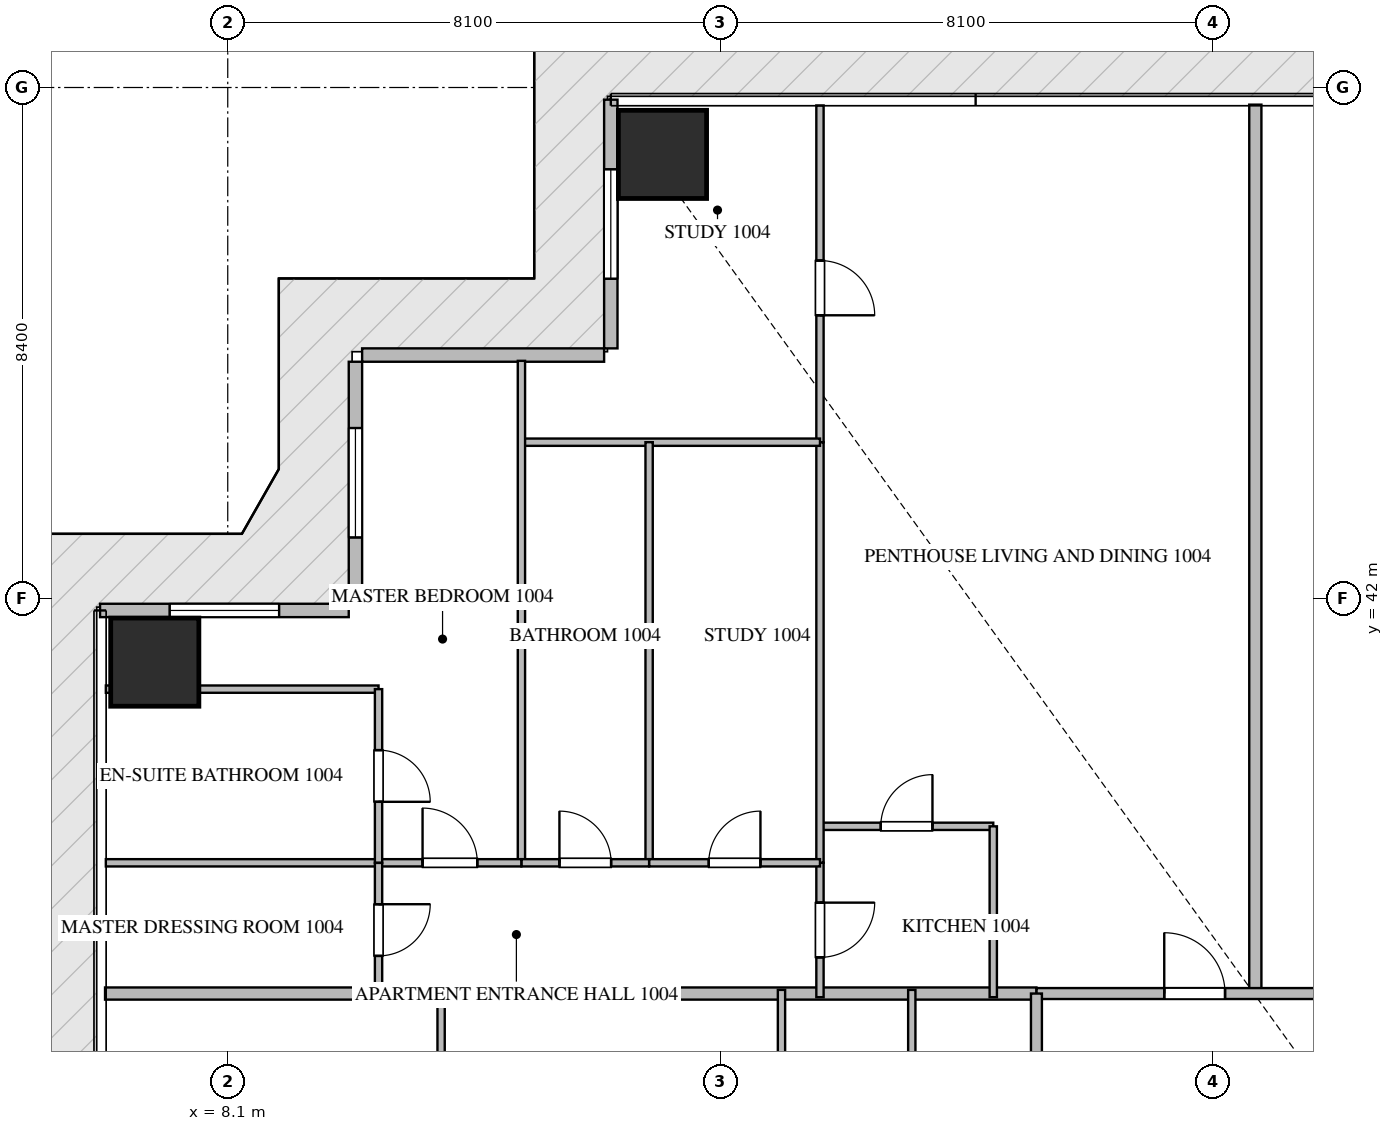
"""IFC4 building model, lengths in metres.
Left out: names, types, materials, properties, quantities, classifications, styles, units other than length and angle.
Written with IfcOpenShell. Run it as: python <this file> out.ifc"""

import sys

from ifc_helpers import new_model, si_unit, direction, frame, frame_2d, origin, origin_2d, place, context, subcontext, project, spatial, rectangle, extrude, source, transform, mapped, element, fill, save


model = new_model("IFC4")
c1 = context("Model", 3, precision=1e-05, world=origin(), true_north=direction((0.0, 1.0)))
c2 = subcontext(c1, "Body", "Model", "MODEL_VIEW")
j1 = project(units=[si_unit("LENGTHUNIT", "METRE"), si_unit("PLANEANGLEUNIT", "RADIAN")], contexts=[c1])
p1 = place(None, origin())
s1 = spatial("IfcSite", under=j1, at=p1, CompositionType="ELEMENT")
p2 = place(p1, origin())
s2 = spatial("IfcBuilding", under=s1, at=p2, CompositionType="ELEMENT")
p3 = place(p2, frame((0.0, 0.0, 45.45)))
s3 = spatial("IfcBuildingStorey", under=s2, at=p3, CompositionType="ELEMENT", Elevation=45.45)
m1 = source(origin(), c2, "Body", "SweptSolid", [
    extrude(rectangle(XDim=1.45, YDim=1.45, at=origin_2d()), origin(), (0.0, 0.0, 1.0), 3.75),
])
for number, where, z_axis, x_axis in (
    (1, (15.25, 49.3, -0.26), (0.0, 0.0, 1.0), (1.0, 0.0, 0.0)),
    (2, (6.9, 40.95, -0.26), (0.0, 0.0, 1.0), (1.0, 0.0, 0.0)),
):
    element("IfcColumn", number, at=place(p3, frame(where, z_axis=z_axis, x_axis=x_axis)), inside=s3, PredefinedType="COLUMN", context=c2, shape_type="MappedRepresentation", body=[
        mapped(m1, transform((0.0, 0.0, 0.0), scale=1.0)),
    ])
p4 = place(p3, frame((14.4, 50.2, 0.0), z_axis=(0.0, 0.0, 1.0), x_axis=(0.0, -1.0, 0.0)))
e3 = element("IfcWall", 3, at=p4, inside=s3, PredefinedType="ELEMENTEDWALL", context=c2, shape_type="SweptSolid", body=[
    extrude(rectangle(XDim=4.09, YDim=0.22, at=frame_2d((2.045, 0.0))), origin(), (0.0, 0.0, 1.0), 3.475),
])
p5 = place(p4, frame((1.145, 0.0, 0.65)))
e4 = element("IfcOpeningElement", 4, at=p5, cuts=e3, PredefinedType="OPENING", context=c2, shape_type="SweptSolid", body=[
    extrude(rectangle(XDim=1.8, YDim=2.1, at=frame_2d((0.9, 1.05))), frame((0.0, 0.12, 0.0), z_axis=(0.0, -1.0, 0.0), x_axis=(1.0, 0.0, 0.0)), (0.0, 0.0, 1.0), 0.24),
])
p6 = place(p3, frame((14.29, 46.0, 0.0), z_axis=(0.0, 0.0, 1.0), x_axis=(-1.0, 0.0, 0.0)))
e5 = element("IfcWall", 5, at=p6, inside=s3, PredefinedType="ELEMENTEDWALL", context=c2, shape_type="SweptSolid", body=[
    extrude(rectangle(XDim=3.98, YDim=0.22, at=frame_2d((1.99, 0.0))), origin(), (0.0, 0.0, 1.0), 3.475),
])
p7 = place(p3, frame((10.2, 45.89, 0.0), z_axis=(0.0, 0.0, 1.0), x_axis=(0.0, -1.0, 0.0)))
e6 = element("IfcWall", 6, at=p7, inside=s3, PredefinedType="ELEMENTEDWALL", context=c2, shape_type="SweptSolid", body=[
    extrude(rectangle(XDim=3.98, YDim=0.22, at=frame_2d((1.99, 0.0))), origin(), (0.0, 0.0, 1.0), 3.475),
])
p8 = place(p7, frame((1.09, 0.0, 0.65)))
e7 = element("IfcOpeningElement", 7, at=p8, cuts=e6, PredefinedType="OPENING", context=c2, shape_type="SweptSolid", body=[
    extrude(rectangle(XDim=1.8, YDim=2.1, at=frame_2d((0.9, 1.05))), frame((0.0, 0.12, 0.0), z_axis=(0.0, -1.0, 0.0), x_axis=(1.0, 0.0, 0.0)), (0.0, 0.0, 1.0), 0.24),
])
p9 = place(p3, frame((10.09, 41.8, 0.0), z_axis=(0.0, 0.0, 1.0), x_axis=(-1.0, 0.0, 0.0)))
e8 = element("IfcWall", 8, at=p9, inside=s3, PredefinedType="ELEMENTEDWALL", context=c2, shape_type="SweptSolid", body=[
    extrude(rectangle(XDim=4.09, YDim=0.22, at=frame_2d((2.045, 0.0))), origin(), (0.0, 0.0, 1.0), 3.475),
])
p10 = place(p9, frame((1.145, 0.0, 0.65)))
e9 = element("IfcOpeningElement", 9, at=p10, cuts=e8, PredefinedType="OPENING", context=c2, shape_type="SweptSolid", body=[
    extrude(rectangle(XDim=1.8, YDim=2.1, at=frame_2d((0.9, 1.05))), frame((0.0, 0.12, 0.0), z_axis=(0.0, -1.0, 0.0), x_axis=(1.0, 0.0, 0.0)), (0.0, 0.0, 1.0), 0.24),
])
p11 = place(p3, frame((25.0, 35.5, 0.0), z_axis=(0.0, 0.0, 1.0), x_axis=(0.0, 1.0, 0.0)))
e10 = element("IfcWall", 10, at=p11, inside=s3, PredefinedType="PARTITIONING", context=c2, shape_type="SweptSolid", body=[
    extrude(rectangle(XDim=14.618, YDim=0.2, at=frame_2d((7.309, 0.0))), origin(), (0.0, 0.0, 1.0), 3.49),
])
p12 = place(p3, frame((6.082, 35.5, 0.0), z_axis=(0.0, 0.0, 1.0), x_axis=(1.0, 0.0, 0.0)))
e11 = element("IfcWall", 11, at=p12, inside=s3, PredefinedType="PARTITIONING", context=c2, shape_type="SweptSolid", body=[
    extrude(rectangle(XDim=15.318, YDim=0.2, at=frame_2d((7.659, 0.0))), origin(), (0.0, 0.0, 1.0), 3.49),
])
p13 = place(p3, frame((21.402, 35.5, 0.0), z_axis=(0.0, 0.0, 1.0), x_axis=(1.0, 0.0, 0.0)))
e12 = element("IfcWall", 12, at=p13, inside=s3, PredefinedType="PARTITIONING", context=c2, shape_type="SweptSolid", body=[
    extrude(rectangle(XDim=21.996, YDim=0.18, at=frame_2d((10.998, 0.0))), origin(), (0.0, 0.0, 1.0), 3.49),
])
p14 = place(p13, frame((2.1, 0.0, 0.0)))
e13 = element("IfcOpeningElement", 13, at=p14, cuts=e12, PredefinedType="OPENING", context=c2, shape_type="SweptSolid", body=[
    extrude(rectangle(XDim=1.0, YDim=2.15, at=frame_2d((0.5, 1.075))), frame((0.0, 0.1, 0.0), z_axis=(0.0, -1.0, 0.0), x_axis=(1.0, 0.0, 0.0)), (0.0, 0.0, 1.0), 0.2),
])
p15 = place(p13, frame((5.333, 0.0, 0.0)))
e14 = element("IfcOpeningElement", 14, at=p15, cuts=e12, PredefinedType="OPENING", context=c2, shape_type="SweptSolid", body=[
    extrude(rectangle(XDim=1.0, YDim=2.15, at=frame_2d((0.5, 1.075))), frame((0.0, 0.1, 0.0), z_axis=(0.0, -1.0, 0.0), x_axis=(1.0, 0.0, 0.0)), (0.0, 0.0, 1.0), 0.2),
])
p16 = place(p13, frame((11.842, 0.0, 0.0)))
e15 = element("IfcOpeningElement", 15, at=p16, cuts=e12, PredefinedType="OPENING", context=c2, shape_type="SweptSolid", body=[
    extrude(rectangle(XDim=1.0, YDim=2.15, at=frame_2d((0.5, 1.075))), frame((0.0, 0.1, 0.0), z_axis=(0.0, -1.0, 0.0), x_axis=(1.0, 0.0, 0.0)), (0.0, 0.0, 1.0), 0.2),
])
p17 = place(p13, frame((18.896, 0.0, 0.0)))
e16 = element("IfcOpeningElement", 16, at=p17, cuts=e12, PredefinedType="OPENING", context=c2, shape_type="SweptSolid", body=[
    extrude(rectangle(XDim=1.0, YDim=2.15, at=frame_2d((0.5, 1.075))), frame((0.0, 0.1, 0.0), z_axis=(0.0, -1.0, 0.0), x_axis=(1.0, 0.0, 0.0)), (0.0, 0.0, 1.0), 0.2),
])
p18 = place(p3, frame((21.4, 14.9, 0.0), z_axis=(0.0, 0.0, 1.0), x_axis=(0.0, 1.0, 0.0)))
e17 = element("IfcWall", 17, at=p18, inside=s3, PredefinedType="PARTITIONING", context=c2, shape_type="SweptSolid", body=[
    extrude(rectangle(XDim=20.6, YDim=0.18, at=frame_2d((10.3, 0.0))), origin(), (0.0, 0.0, 1.0), 3.49),
])
p19 = place(p18, frame((5.331, 0.0, 0.0)))
e18 = element("IfcOpeningElement", 18, at=p19, cuts=e17, PredefinedType="OPENING", context=c2, shape_type="SweptSolid", body=[
    extrude(rectangle(XDim=1.0, YDim=2.15, at=frame_2d((0.5, 1.075))), frame((0.0, 0.1, 0.0), z_axis=(0.0, -1.0, 0.0), x_axis=(1.0, 0.0, 0.0)), (0.0, 0.0, 1.0), 0.2),
])
p20 = place(p18, frame((10.408, 0.0, 0.0)))
e19 = element("IfcOpeningElement", 19, at=p20, cuts=e17, PredefinedType="OPENING", context=c2, shape_type="SweptSolid", body=[
    extrude(rectangle(XDim=1.0, YDim=2.15, at=frame_2d((0.5, 1.075))), frame((0.0, 0.1, 0.0), z_axis=(0.0, -1.0, 0.0), x_axis=(1.0, 0.0, 0.0)), (0.0, 0.0, 1.0), 0.2),
])
p21 = place(p3, frame((17.84, 38.25, 0.0), z_axis=(0.0, 0.0, 1.0), x_axis=(1.0, 0.0, 0.0)))
e20 = element("IfcWall", 20, at=p21, inside=s3, PredefinedType="PARTITIONING", context=c2, shape_type="SweptSolid", body=[
    extrude(rectangle(XDim=2.85, YDim=0.12, at=frame_2d((1.425, 0.0))), origin(), (0.0, 0.0, 1.0), 3.49),
])
p22 = place(p21, frame((1.0, 0.0, 0.0)))
e21 = element("IfcOpeningElement", 21, at=p22, cuts=e20, PredefinedType="OPENING", context=c2, shape_type="SweptSolid", body=[
    extrude(rectangle(XDim=0.85, YDim=2.1, at=frame_2d((0.425, 1.05))), frame((0.0, 0.07, 0.0), z_axis=(0.0, -1.0, 0.0), x_axis=(1.0, 0.0, 0.0)), (0.0, 0.0, 1.0), 0.14),
])
p23 = place(p3, frame((20.69, 38.25, 0.0), z_axis=(0.0, 0.0, 1.0), x_axis=(0.0, -1.0, 0.0)))
e22 = element("IfcWall", 22, at=p23, inside=s3, PredefinedType="PARTITIONING", context=c2, shape_type="SweptSolid", body=[
    extrude(rectangle(XDim=2.81, YDim=0.12, at=frame_2d((1.405, 0.0))), origin(), (0.0, 0.0, 1.0), 3.49),
])
p24 = place(p3, frame((17.84, 37.65, 0.0), z_axis=(0.0, 0.0, 1.0), x_axis=(0.0, -1.0, 0.0)))
e23 = element("IfcWall", 23, at=p24, inside=s3, PredefinedType="PARTITIONING", context=c2, shape_type="SweptSolid", body=[
    extrude(rectangle(XDim=2.21, YDim=0.12, at=frame_2d((1.105, 0.0))), origin(), (0.0, 0.0, 1.0), 3.49),
])
p25 = place(p24, frame((0.655, 0.0, 0.0)))
e24 = element("IfcOpeningElement", 24, at=p25, cuts=e23, PredefinedType="OPENING", context=c2, shape_type="SweptSolid", body=[
    extrude(rectangle(XDim=0.9, YDim=2.1, at=frame_2d((0.45, 1.05))), frame((0.0, 0.07, 0.0), z_axis=(0.0, -1.0, 0.0), x_axis=(1.0, 0.0, 0.0)), (0.0, 0.0, 1.0), 0.14),
])
p26 = place(p3, frame((17.84, 50.105, 0.0), z_axis=(0.0, 0.0, 1.0), x_axis=(0.0, -1.0, 0.0)))
e25 = element("IfcWall", 25, at=p26, inside=s3, PredefinedType="PARTITIONING", context=c2, shape_type="SweptSolid", body=[
    extrude(rectangle(XDim=5.538, YDim=0.12, at=frame_2d((2.769, 0.0))), origin(), (0.0, 0.0, 1.0), 3.49),
])
p27 = place(p26, frame((2.551, 0.0, 0.0)))
e26 = element("IfcOpeningElement", 26, at=p27, cuts=e25, PredefinedType="OPENING", context=c2, shape_type="SweptSolid", body=[
    extrude(rectangle(XDim=0.9, YDim=2.1, at=frame_2d((0.45, 1.05))), frame((0.0, 0.07, 0.0), z_axis=(0.0, -1.0, 0.0), x_axis=(1.0, 0.0, 0.0)), (0.0, 0.0, 1.0), 0.14),
])
p28 = place(p3, frame((17.84, 44.565, 0.0), z_axis=(0.0, 0.0, 1.0), x_axis=(0.0, -1.0, 0.0)))
e27 = element("IfcWall", 27, at=p28, inside=s3, PredefinedType="PARTITIONING", context=c2, shape_type="SweptSolid", body=[
    extrude(rectangle(XDim=6.913, YDim=0.12, at=frame_2d((3.457, 0.0))), origin(), (0.0, 0.0, 1.0), 3.49),
])
p29 = place(p3, frame((12.93, 44.567, 0.0), z_axis=(0.0, 0.0, 1.0), x_axis=(1.0, 0.0, 0.0)))
e28 = element("IfcWall", 28, at=p29, inside=s3, PredefinedType="PARTITIONING", context=c2, shape_type="SweptSolid", body=[
    extrude(rectangle(XDim=4.91, YDim=0.12, at=frame_2d((2.455, 0.0))), origin(), (0.0, 0.0, 1.0), 3.49),
])
p30 = place(p3, frame((12.93, 45.905, 0.0), z_axis=(0.0, 0.0, 1.0), x_axis=(0.0, -1.0, 0.0)))
e29 = element("IfcWall", 29, at=p30, inside=s3, PredefinedType="PARTITIONING", context=c2, shape_type="SweptSolid", body=[
    extrude(rectangle(XDim=8.255, YDim=0.12, at=frame_2d((4.127, 0.0))), origin(), (0.0, 0.0, 1.0), 3.49),
])
p31 = place(p3, frame((15.03, 44.567, 0.0), z_axis=(0.0, 0.0, 1.0), x_axis=(0.0, -1.0, 0.0)))
e30 = element("IfcWall", 30, at=p31, inside=s3, PredefinedType="PARTITIONING", context=c2, shape_type="SweptSolid", body=[
    extrude(rectangle(XDim=6.917, YDim=0.12, at=frame_2d((3.458, 0.0))), origin(), (0.0, 0.0, 1.0), 2.922),
])
p32 = place(p3, frame((12.93, 37.65, 0.0), z_axis=(0.0, 0.0, 1.0), x_axis=(1.0, 0.0, 0.0)))
e31 = element("IfcWall", 31, at=p32, inside=s3, PredefinedType="PARTITIONING", context=c2, shape_type="SweptSolid", body=[
    extrude(rectangle(XDim=2.1, YDim=0.12, at=frame_2d((1.05, 0.0))), origin(), (0.0, 0.0, 1.0), 3.49),
])
p33 = place(p32, frame((0.625, 0.0, 0.0)))
e32 = element("IfcOpeningElement", 32, at=p33, cuts=e31, PredefinedType="OPENING", context=c2, shape_type="SweptSolid", body=[
    extrude(rectangle(XDim=0.85, YDim=2.1, at=frame_2d((0.425, 1.05))), frame((0.0, 0.07, 0.0), z_axis=(0.0, -1.0, 0.0), x_axis=(1.0, 0.0, 0.0)), (0.0, 0.0, 1.0), 0.14),
])
p34 = place(p3, frame((15.032, 37.65, 0.0), z_axis=(0.0, 0.0, 1.0), x_axis=(1.0, 0.0, 0.0)))
e33 = element("IfcWall", 33, at=p34, inside=s3, PredefinedType="PARTITIONING", context=c2, shape_type="SweptSolid", body=[
    extrude(rectangle(XDim=2.808, YDim=0.12, at=frame_2d((1.404, 0.0))), origin(), (0.0, 0.0, 1.0), 3.49),
])
p35 = place(p34, frame((0.979, 0.0, 0.0)))
e34 = element("IfcOpeningElement", 34, at=p35, cuts=e33, PredefinedType="OPENING", context=c2, shape_type="SweptSolid", body=[
    extrude(rectangle(XDim=0.85, YDim=2.1, at=frame_2d((0.425, 1.05))), frame((0.0, 0.07, 0.0), z_axis=(0.0, -1.0, 0.0), x_axis=(1.0, 0.0, 0.0)), (0.0, 0.0, 1.0), 0.14),
])
p36 = place(p3, frame((10.58, 37.65, 0.0), z_axis=(0.0, 0.0, 1.0), x_axis=(1.0, 0.0, 0.0)))
e35 = element("IfcWall", 35, at=p36, inside=s3, PredefinedType="PARTITIONING", context=c2, shape_type="SweptSolid", body=[
    extrude(rectangle(XDim=2.348, YDim=0.12, at=frame_2d((1.174, 0.0))), origin(), (0.0, 0.0, 1.0), 3.49),
])
p37 = place(p36, frame((0.724, 0.0, 0.0)))
e36 = element("IfcOpeningElement", 36, at=p37, cuts=e35, PredefinedType="OPENING", context=c2, shape_type="SweptSolid", body=[
    extrude(rectangle(XDim=0.9, YDim=2.1, at=frame_2d((0.45, 1.05))), frame((0.0, 0.07, 0.0), z_axis=(0.0, -1.0, 0.0), x_axis=(1.0, 0.0, 0.0)), (0.0, 0.0, 1.0), 0.14),
])
p38 = place(p3, frame((6.095, 40.506, 0.0), z_axis=(0.0, 0.0, 1.0), x_axis=(1.0, 0.0, 0.0)))
e37 = element("IfcWall", 37, at=p38, inside=s3, PredefinedType="PARTITIONING", context=c2, shape_type="SweptSolid", body=[
    extrude(rectangle(XDim=4.485, YDim=0.12, at=frame_2d((2.243, 0.0))), origin(), (0.0, 0.0, 1.0), 3.49),
])
p39 = place(p3, frame((6.095, 37.65, 0.0), z_axis=(0.0, 0.0, 1.0), x_axis=(1.0, 0.0, 0.0)))
e38 = element("IfcWall", 38, at=p39, inside=s3, PredefinedType="PARTITIONING", context=c2, shape_type="SweptSolid", body=[
    extrude(rectangle(XDim=4.483, YDim=0.12, at=frame_2d((2.241, 0.0))), origin(), (0.0, 0.0, 1.0), 3.49),
])
p40 = place(p3, frame((10.58, 40.506, 0.0), z_axis=(0.0, 0.0, 1.0), x_axis=(0.0, -1.0, 0.0)))
e39 = element("IfcWall", 39, at=p40, inside=s3, PredefinedType="PARTITIONING", context=c2, shape_type="SweptSolid", body=[
    extrude(rectangle(XDim=2.856, YDim=0.12, at=frame_2d((1.428, 0.0))), origin(), (0.0, 0.0, 1.0), 3.49),
])
p41 = place(p40, frame((1.003, 0.0, 0.0)))
e40 = element("IfcOpeningElement", 40, at=p41, cuts=e39, PredefinedType="OPENING", context=c2, shape_type="SweptSolid", body=[
    extrude(rectangle(XDim=0.85, YDim=2.1, at=frame_2d((0.425, 1.05))), frame((0.0, 0.07, 0.0), z_axis=(0.0, -1.0, 0.0), x_axis=(1.0, 0.0, 0.0)), (0.0, 0.0, 1.0), 0.14),
])
p42 = place(p3, frame((10.58, 37.648, 0.0), z_axis=(0.0, 0.0, 1.0), x_axis=(0.0, -1.0, 0.0)))
e41 = element("IfcWall", 41, at=p42, inside=s3, PredefinedType="PARTITIONING", context=c2, shape_type="SweptSolid", body=[
    extrude(rectangle(XDim=2.208, YDim=0.12, at=frame_2d((1.104, 0.0))), origin(), (0.0, 0.0, 1.0), 3.49),
])
p43 = place(p42, frame((0.679, 0.0, 0.0)))
e42 = element("IfcOpeningElement", 42, at=p43, cuts=e41, PredefinedType="OPENING", context=c2, shape_type="SweptSolid", body=[
    extrude(rectangle(XDim=0.85, YDim=2.1, at=frame_2d((0.425, 1.05))), frame((0.0, 0.07, 0.0), z_axis=(0.0, -1.0, 0.0), x_axis=(1.0, 0.0, 0.0)), (0.0, 0.0, 1.0), 0.14),
])
for number, where, z_axis, x_axis in (
    (43, (11.609, 27.8, 0.0), (0.0, 0.0, 1.0), (0.0, 1.0, 0.0)),
    (44, (17.207, 27.8, 0.0), (0.0, 0.0, 1.0), (0.0, 1.0, 0.0)),
    (45, (19.35, 27.8, 0.0), (0.0, 0.0, 1.0), (0.0, 1.0, 0.0)),
):
    element("IfcWall", number, at=place(p3, frame(where, z_axis=z_axis, x_axis=x_axis)), inside=s3, PredefinedType="PARTITIONING", context=c2, shape_type="SweptSolid", body=[
        extrude(rectangle(XDim=7.76, YDim=0.12, at=frame_2d((3.88, 0.0))), origin(), (0.0, 0.0, 1.0), 3.49),
    ])
m2 = source(origin(), c2, "Body", "SweptSolid", [
    extrude(rectangle(XDim=1.8, YDim=2.1, at=frame_2d((0.9, 1.05))), frame((0.0, 0.03, 0.0), z_axis=(0.0, -1.0, 0.0), x_axis=(1.0, 0.0, 0.0)), (0.0, 0.0, 1.0), 0.06),
])
p44 = place(p5, origin())
e46 = element("IfcWindow", 46, at=p44, inside=s3, PartitioningType="SINGLE_PANEL", PredefinedType="WINDOW", context=c2, shape_type="MappedRepresentation", body=[
    mapped(m2, transform((0.0, 0.0, 0.0), scale=1.0)),
])
fill(e4, e46)
p45 = place(p8, origin())
e47 = element("IfcWindow", 47, at=p45, inside=s3, PartitioningType="SINGLE_PANEL", PredefinedType="WINDOW", context=c2, shape_type="MappedRepresentation", body=[
    mapped(m2, transform((0.0, 0.0, 0.0), scale=1.0)),
])
fill(e7, e47)
p46 = place(p10, origin())
e48 = element("IfcWindow", 48, at=p46, inside=s3, PartitioningType="SINGLE_PANEL", PredefinedType="WINDOW", context=c2, shape_type="MappedRepresentation", body=[
    mapped(m2, transform((0.0, 0.0, 0.0), scale=1.0)),
])
fill(e9, e48)
m3 = source(origin(), c2, "Body", "SweptSolid", [
    extrude(rectangle(XDim=1.0, YDim=2.15, at=frame_2d((0.5, 1.075))), frame((0.0, 0.025, 0.0), z_axis=(0.0, -1.0, 0.0), x_axis=(1.0, 0.0, 0.0)), (0.0, 0.0, 1.0), 0.05),
])
p47 = place(p14, origin())
e49 = element("IfcDoor", 49, at=p47, inside=s3, OperationType="SINGLE_SWING_LEFT", PredefinedType="DOOR", context=c2, shape_type="MappedRepresentation", body=[
    mapped(m3, transform((0.0, 0.0, 0.0), scale=1.0)),
])
fill(e13, e49)
m4 = source(origin(), c2, "Body", "SweptSolid", [
    extrude(rectangle(XDim=0.85, YDim=2.1, at=frame_2d((0.425, 1.05))), frame((0.0, 0.025, 0.0), z_axis=(0.0, -1.0, 0.0), x_axis=(1.0, 0.0, 0.0)), (0.0, 0.0, 1.0), 0.05),
])
p48 = place(p22, origin())
e50 = element("IfcDoor", 50, at=p48, inside=s3, OperationType="SINGLE_SWING_RIGHT", PredefinedType="DOOR", context=c2, shape_type="MappedRepresentation", body=[
    mapped(m4, transform((0.0, 0.0, 0.0), scale=1.0)),
])
fill(e21, e50)
m5 = source(origin(), c2, "Body", "SweptSolid", [
    extrude(rectangle(XDim=0.9, YDim=2.1, at=frame_2d((0.45, 1.05))), frame((0.0, 0.025, 0.0), z_axis=(0.0, -1.0, 0.0), x_axis=(1.0, 0.0, 0.0)), (0.0, 0.0, 1.0), 0.05),
])
p49 = place(p25, origin())
e51 = element("IfcDoor", 51, at=p49, inside=s3, OperationType="SINGLE_SWING_LEFT", PredefinedType="DOOR", context=c2, shape_type="MappedRepresentation", body=[
    mapped(m5, transform((0.0, 0.0, 0.0), scale=1.0)),
])
fill(e24, e51)
p50 = place(p27, origin())
e52 = element("IfcDoor", 52, at=p50, inside=s3, OperationType="SINGLE_SWING_RIGHT", PredefinedType="DOOR", context=c2, shape_type="MappedRepresentation", body=[
    mapped(m5, transform((0.0, 0.0, 0.0), scale=1.0)),
])
fill(e26, e52)
p51 = place(p33, origin())
e53 = element("IfcDoor", 53, at=p51, inside=s3, OperationType="SINGLE_SWING_LEFT", PredefinedType="DOOR", context=c2, shape_type="MappedRepresentation", body=[
    mapped(m4, transform((0.0, 0.0, 0.0), scale=1.0)),
])
fill(e32, e53)
p52 = place(p35, origin())
e54 = element("IfcDoor", 54, at=p52, inside=s3, OperationType="SINGLE_SWING_RIGHT", PredefinedType="DOOR", context=c2, shape_type="MappedRepresentation", body=[
    mapped(m4, transform((0.0, 0.0, 0.0), scale=1.0)),
])
fill(e34, e54)
p53 = place(p37, origin())
e55 = element("IfcDoor", 55, at=p53, inside=s3, OperationType="SINGLE_SWING_LEFT", PredefinedType="DOOR", context=c2, shape_type="MappedRepresentation", body=[
    mapped(m5, transform((0.0, 0.0, 0.0), scale=1.0)),
])
fill(e36, e55)
p54 = place(p41, origin())
e56 = element("IfcDoor", 56, at=p54, inside=s3, OperationType="SINGLE_SWING_RIGHT", PredefinedType="DOOR", context=c2, shape_type="MappedRepresentation", body=[
    mapped(m4, transform((0.0, 0.0, 0.0), scale=1.0)),
])
fill(e40, e56)
p55 = place(p43, origin())
e57 = element("IfcDoor", 57, at=p55, inside=s3, OperationType="SINGLE_SWING_LEFT", PredefinedType="DOOR", context=c2, shape_type="MappedRepresentation", body=[
    mapped(m4, transform((0.0, 0.0, 0.0), scale=1.0)),
])
fill(e42, e57)
save(model, sys.argv[1])
